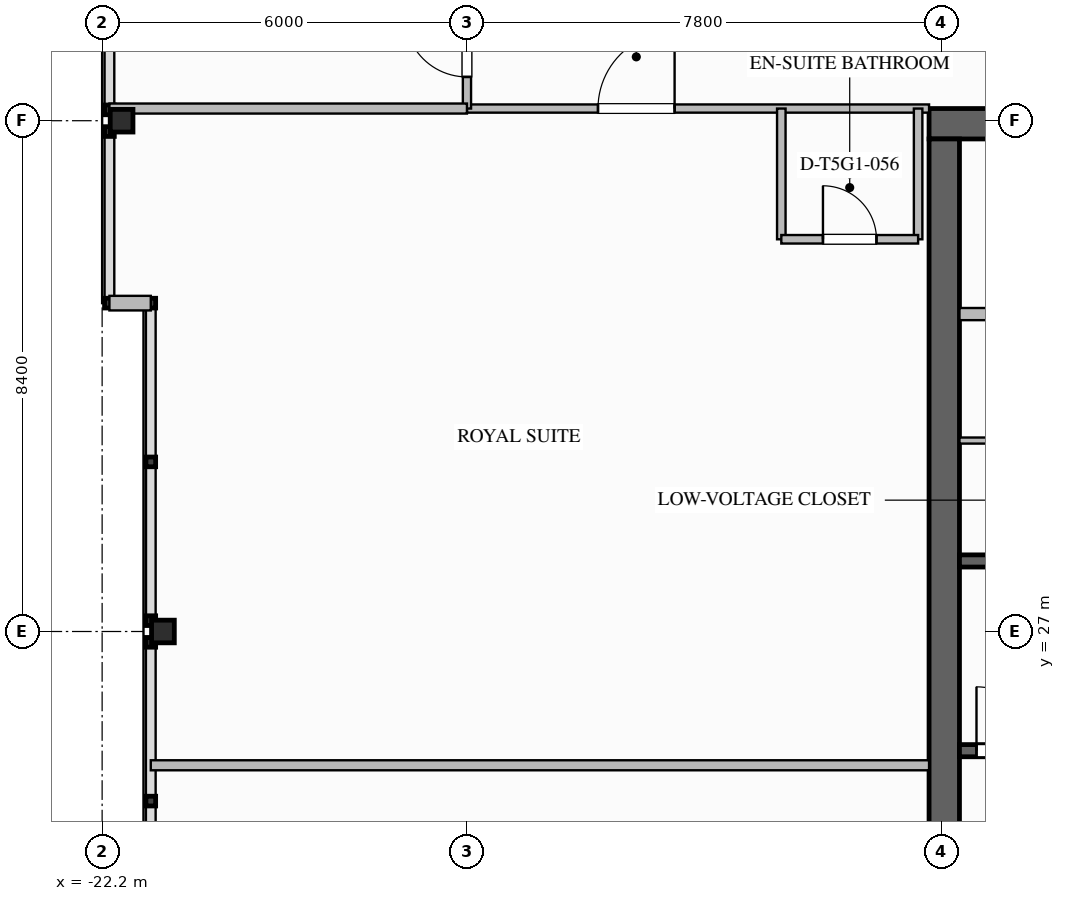
"""IFC4 building model, lengths in metres.
Left out: names, types, materials, properties, quantities, classifications, styles, units other than length and angle.
Written with IfcOpenShell. Run it as: python <this file> out.ifc"""

import sys

from ifc_helpers import new_model, si_unit, direction, frame, frame_2d, origin, origin_2d, place, context, subcontext, project, spatial, rectangle, i_section, extrude, element, fill, save


model = new_model("IFC4")
c1 = context("Model", 3, precision=1e-05, world=origin(), true_north=direction((0.0, 1.0)))
c2 = subcontext(c1, "Body", "Model", "MODEL_VIEW")
j1 = project(units=[si_unit("LENGTHUNIT", "METRE"), si_unit("PLANEANGLEUNIT", "RADIAN")], contexts=[c1])
p1 = place(None, origin())
s1 = spatial("IfcSite", under=j1, at=p1, CompositionType="ELEMENT")
p2 = place(p1, origin())
s2 = spatial("IfcBuilding", under=s1, at=p2, CompositionType="ELEMENT")
p3 = place(p2, frame((0.0, 0.0, 265.0)))
s3 = spatial("IfcBuildingStorey", under=s2, at=p3, CompositionType="ELEMENT", Elevation=265.0)
p4 = place(p3, frame((-8.6, 35.35, 0.0), z_axis=(0.0, 0.0, 1.0), x_axis=(1.0, 0.0, 0.0)))
e1 = element("IfcWall", 1, at=p4, inside=s3, PredefinedType="SHEAR", context=c2, shape_type="SweptSolid", body=[
    extrude(rectangle(XDim=17.2, YDim=0.5, at=frame_2d((8.6, 0.0))), origin(), (0.0, 0.0, 1.0), 3.65),
])
p5 = place(p3, frame((-8.35, 18.9, 0.0), z_axis=(0.0, 0.0, 1.0), x_axis=(0.0, 1.0, 0.0)))
e2 = element("IfcWall", 2, at=p5, inside=s3, PredefinedType="SHEAR", context=c2, shape_type="SweptSolid", body=[
    extrude(rectangle(XDim=16.2, YDim=0.5, at=frame_2d((8.1, 0.0))), origin(), (0.0, 0.0, 1.0), 3.65),
])
for number, where, z_axis, x_axis in (
    (3, (-21.2, 27.0, 0.0), (0.0, 0.0, 1.0), (1.0, 0.0, 0.0)),
    (4, (-21.88, 35.4, 0.0), (0.0, 0.0, 1.0), (1.0, 0.0, 0.0)),
):
    element("IfcColumn", number, at=place(p3, frame(where, z_axis=z_axis, x_axis=x_axis)), inside=s3, PredefinedType="COLUMN", context=c2, shape_type="SweptSolid", body=[
        extrude(i_section(OverallWidth=0.374, OverallDepth=0.372, WebThickness=0.016, FlangeThickness=0.026, FilletRadius=0.025, at=origin_2d()), origin(), (0.0, 0.0, 1.0), 3.647),
    ])
p6 = place(p3, frame((-21.4, 32.4, 0.0), z_axis=(0.0, 0.0, 1.0), x_axis=(-1.0, 0.0, 0.0)))
e5 = element("IfcWall", 5, at=p6, inside=s3, PredefinedType="STANDARD", context=c2, shape_type="SweptSolid", body=[
    extrude(rectangle(XDim=0.68, YDim=0.24, at=frame_2d((0.34, 0.0))), origin(), (0.0, 0.0, 1.0), 3.39),
])
p7 = place(p3, frame((-8.1, 25.04, 0.0), z_axis=(0.0, 0.0, 1.0), x_axis=(1.0, 0.0, 0.0)))
e6 = element("IfcWall", 6, at=p7, inside=s3, PredefinedType="SOLIDWALL", context=c2, shape_type="SweptSolid", body=[
    extrude(rectangle(XDim=8.1, YDim=0.2, at=frame_2d((4.05, 0.0))), origin(), (0.0, 0.0, 1.0), 3.39),
])
p8 = place(p7, frame((0.28, 0.0, 0.0)))
e7 = element("IfcOpeningElement", 7, at=p8, cuts=e6, PredefinedType="OPENING", context=c2, shape_type="SweptSolid", body=[
    extrude(rectangle(XDim=1.05, YDim=2.1, at=frame_2d((0.525, 1.05))), frame((0.0, 0.11, 0.0), z_axis=(0.0, -1.0, 0.0), x_axis=(1.0, 0.0, 0.0)), (0.0, 0.0, 1.0), 0.22),
])
p9 = place(p3, frame((-8.1, 28.16, 0.0), z_axis=(0.0, 0.0, 1.0), x_axis=(1.0, 0.0, 0.0)))
e8 = element("IfcWall", 8, at=p9, inside=s3, PredefinedType="SOLIDWALL", context=c2, shape_type="SweptSolid", body=[
    extrude(rectangle(XDim=8.1, YDim=0.2, at=frame_2d((4.05, 0.0))), origin(), (0.0, 0.0, 1.0), 3.39),
])
p10 = place(p3, frame((-8.1, 32.22, 0.0), z_axis=(0.0, 0.0, 1.0), x_axis=(1.0, 0.0, 0.0)))
e9 = element("IfcWall", 9, at=p10, inside=s3, PredefinedType="SOLIDWALL", context=c2, shape_type="SweptSolid", body=[
    extrude(rectangle(XDim=7.1, YDim=0.2, at=frame_2d((3.55, 0.0))), origin(), (0.0, 0.0, 1.0), 3.39),
])
p11 = place(p10, frame((0.95, 0.0, 0.0)))
e10 = element("IfcOpeningElement", 10, at=p11, cuts=e9, PredefinedType="OPENING", context=c2, shape_type="SweptSolid", body=[
    extrude(rectangle(XDim=1.1, YDim=2.2, at=frame_2d((0.55, 1.1))), frame((0.0, 0.11, 0.0), z_axis=(0.0, -1.0, 0.0), x_axis=(1.0, 0.0, 0.0)), (0.0, 0.0, 1.0), 0.22),
])
p12 = place(p10, frame((3.27, 0.0, 0.0)))
e11 = element("IfcOpeningElement", 11, at=p12, cuts=e9, PredefinedType="OPENING", context=c2, shape_type="SweptSolid", body=[
    extrude(rectangle(XDim=1.1, YDim=2.2, at=frame_2d((0.55, 1.1))), frame((0.0, 0.11, 0.0), z_axis=(0.0, -1.0, 0.0), x_axis=(1.0, 0.0, 0.0)), (0.0, 0.0, 1.0), 0.22),
])
p13 = place(p10, frame((5.59, 0.0, 0.0)))
e12 = element("IfcOpeningElement", 12, at=p13, cuts=e9, PredefinedType="OPENING", context=c2, shape_type="SweptSolid", body=[
    extrude(rectangle(XDim=1.1, YDim=2.2, at=frame_2d((0.55, 1.1))), frame((0.0, 0.11, 0.0), z_axis=(0.0, -1.0, 0.0), x_axis=(1.0, 0.0, 0.0)), (0.0, 0.0, 1.0), 0.22),
])
p14 = place(p3, frame((-8.1, 30.14, 0.0), z_axis=(0.0, 0.0, 1.0), x_axis=(1.0, 0.0, 0.0)))
e13 = element("IfcWall", 13, at=p14, inside=s3, PredefinedType="PARTITIONING", context=c2, shape_type="SweptSolid", body=[
    extrude(rectangle(XDim=7.1, YDim=0.1, at=frame_2d((3.55, 0.0))), origin(), (0.0, 0.0, 1.0), 3.39),
])
p15 = place(p14, frame((0.55, 0.0, 0.0)))
e14 = element("IfcOpeningElement", 14, at=p15, cuts=e13, PredefinedType="OPENING", context=c2, shape_type="SweptSolid", body=[
    extrude(rectangle(XDim=0.88, YDim=2.1, at=frame_2d((0.44, 1.05))), frame((0.0, 0.06, 0.0), z_axis=(0.0, -1.0, 0.0), x_axis=(1.0, 0.0, 0.0)), (0.0, 0.0, 1.0), 0.12),
])
p16 = place(p14, frame((3.6, 0.0, 0.0)))
e15 = element("IfcOpeningElement", 15, at=p16, cuts=e13, PredefinedType="OPENING", context=c2, shape_type="SweptSolid", body=[
    extrude(rectangle(XDim=0.92, YDim=2.1, at=frame_2d((0.46, 1.05))), frame((0.0, 0.06, 0.0), z_axis=(0.0, -1.0, 0.0), x_axis=(1.0, 0.0, 0.0)), (0.0, 0.0, 1.0), 0.12),
])
p17 = place(p3, frame((-16.2, 35.6, 0.0), z_axis=(0.0, 0.0, 1.0), x_axis=(1.0, 0.0, 0.0)))
e16 = element("IfcWall", 16, at=p17, inside=s3, PredefinedType="PARTITIONING", context=c2, shape_type="SweptSolid", body=[
    extrude(rectangle(XDim=7.6, YDim=0.135, at=frame_2d((3.8, 0.0))), origin(), (0.0, 0.0, 1.0), 2.767),
])
p18 = place(p17, frame((2.155, 0.0, 0.0)))
e17 = element("IfcOpeningElement", 17, at=p18, cuts=e16, PredefinedType="OPENING", context=c2, shape_type="SweptSolid", body=[
    extrude(rectangle(XDim=1.26, YDim=2.2, at=frame_2d((0.63, 1.1))), frame((0.0, 0.077, 0.0), z_axis=(0.0, -1.0, 0.0), x_axis=(1.0, 0.0, 0.0)), (0.0, 0.0, 1.0), 0.155),
])
p19 = place(p3, frame((-16.2, 35.6, 0.0), z_axis=(0.0, 0.0, 1.0), x_axis=(0.0, 1.0, 0.0)))
e18 = element("IfcWall", 18, at=p19, inside=s3, PredefinedType="PARTITIONING", context=c2, shape_type="SweptSolid", body=[
    extrude(rectangle(XDim=2.85, YDim=0.135, at=frame_2d((1.425, 0.0))), origin(), (0.0, 0.0, 1.0), 2.764),
])
p20 = place(p19, frame((0.52, 0.0, 0.0)))
e19 = element("IfcOpeningElement", 19, at=p20, cuts=e18, PredefinedType="OPENING", context=c2, shape_type="SweptSolid", body=[
    extrude(rectangle(XDim=1.02, YDim=2.15, at=frame_2d((0.51, 1.075))), frame((0.0, 0.077, 0.0), z_axis=(0.0, -1.0, 0.0), x_axis=(1.0, 0.0, 0.0)), (0.0, 0.0, 1.0), 0.155),
])
p21 = place(p3, frame((-22.08, 35.6, 0.0), z_axis=(0.0, 0.0, 1.0), x_axis=(1.0, 0.0, 0.0)))
e20 = element("IfcWall", 20, at=p21, inside=s3, PredefinedType="PARTITIONING", context=c2, shape_type="SweptSolid", body=[
    extrude(rectangle(XDim=5.88, YDim=0.165, at=frame_2d((2.94, 0.0))), origin(), (0.0, 0.0, 1.0), 2.764),
])
p22 = place(p3, frame((-21.4, 24.8, 0.0), z_axis=(0.0, 0.0, 1.0), x_axis=(1.0, 0.0, 0.0)))
e21 = element("IfcWall", 21, at=p22, inside=s3, PredefinedType="PARTITIONING", context=c2, shape_type="SweptSolid", body=[
    extrude(rectangle(XDim=12.8, YDim=0.165, at=frame_2d((6.4, 0.0))), origin(), (0.0, 0.0, 1.0), 3.39),
])
for number, where, z_axis, x_axis in (
    (22, (-11.03, 35.6, 0.0), (0.0, 0.0, 1.0), (0.0, -1.0, 0.0)),
    (23, (-8.78, 35.6, 0.0), (0.0, 0.0, 1.0), (0.0, -1.0, 0.0)),
):
    element("IfcWall", number, at=place(p3, frame(where, z_axis=z_axis, x_axis=x_axis)), inside=s3, PredefinedType="PLUMBINGWALL", context=c2, shape_type="SweptSolid", body=[
        extrude(rectangle(XDim=2.15, YDim=0.14, at=frame_2d((1.075, 0.0))), origin(), (0.0, 0.0, 1.0), 3.39),
    ])
p23 = place(p3, frame((-11.03, 33.45, 0.0), z_axis=(0.0, 0.0, 1.0), x_axis=(1.0, 0.0, 0.0)))
e24 = element("IfcWall", 24, at=p23, inside=s3, PredefinedType="PLUMBINGWALL", context=c2, shape_type="SweptSolid", body=[
    extrude(rectangle(XDim=2.25, YDim=0.14, at=frame_2d((1.125, 0.0))), origin(), (0.0, 0.0, 1.0), 3.39),
])
p24 = place(p23, frame((0.685, 0.0, 0.0)))
e25 = element("IfcOpeningElement", 25, at=p24, cuts=e24, PredefinedType="OPENING", context=c2, shape_type="SweptSolid", body=[
    extrude(rectangle(XDim=0.88, YDim=2.1, at=frame_2d((0.44, 1.05))), frame((0.0, 0.08, 0.0), z_axis=(0.0, -1.0, 0.0), x_axis=(1.0, 0.0, 0.0)), (0.0, 0.0, 1.0), 0.16),
])
p25 = place(p8, origin())
e26 = element("IfcDoor", 26, at=p25, inside=s3, OperationType="SINGLE_SWING_LEFT", PredefinedType="DOOR", context=c2, shape_type="SweptSolid", body=[
    extrude(rectangle(XDim=1.05, YDim=2.1, at=frame_2d((0.525, 1.05))), frame((0.0, 0.025, 0.0), z_axis=(0.0, -1.0, 0.0), x_axis=(1.0, 0.0, 0.0)), (0.0, 0.0, 1.0), 0.05),
])
fill(e7, e26)
p26 = place(p20, origin())
e27 = element("IfcDoor", 27, at=p26, inside=s3, OperationType="SINGLE_SWING_RIGHT", PredefinedType="DOOR", context=c2, shape_type="SweptSolid", body=[
    extrude(rectangle(XDim=1.02, YDim=2.15, at=frame_2d((0.51, 1.075))), frame((0.0, 0.025, 0.0), z_axis=(0.0, -1.0, 0.0), x_axis=(1.0, 0.0, 0.0)), (0.0, 0.0, 1.0), 0.05),
])
fill(e19, e27)
p27 = place(p24, origin())
e28 = element("IfcDoor", 28, at=p27, inside=s3, OperationType="SINGLE_SWING_LEFT", PredefinedType="DOOR", context=c2, shape_type="SweptSolid", body=[
    extrude(rectangle(XDim=0.88, YDim=2.1, at=frame_2d((0.44, 1.05))), frame((0.0, 0.025, 0.0), z_axis=(0.0, -1.0, 0.0), x_axis=(1.0, 0.0, 0.0)), (0.0, 0.0, 1.0), 0.05),
])
fill(e25, e28)
p28 = place(p18, origin())
e29 = element("IfcDoor", 29, at=p28, inside=s3, OperationType="SINGLE_SWING_RIGHT", PredefinedType="DOOR", context=c2, shape_type="SweptSolid", body=[
    extrude(rectangle(XDim=1.26, YDim=2.2, at=frame_2d((0.63, 1.1))), frame((0.0, 0.025, 0.0), z_axis=(0.0, -1.0, 0.0), x_axis=(1.0, 0.0, 0.0)), (0.0, 0.0, 1.0), 0.05),
])
fill(e17, e29)
save(model, sys.argv[1])
